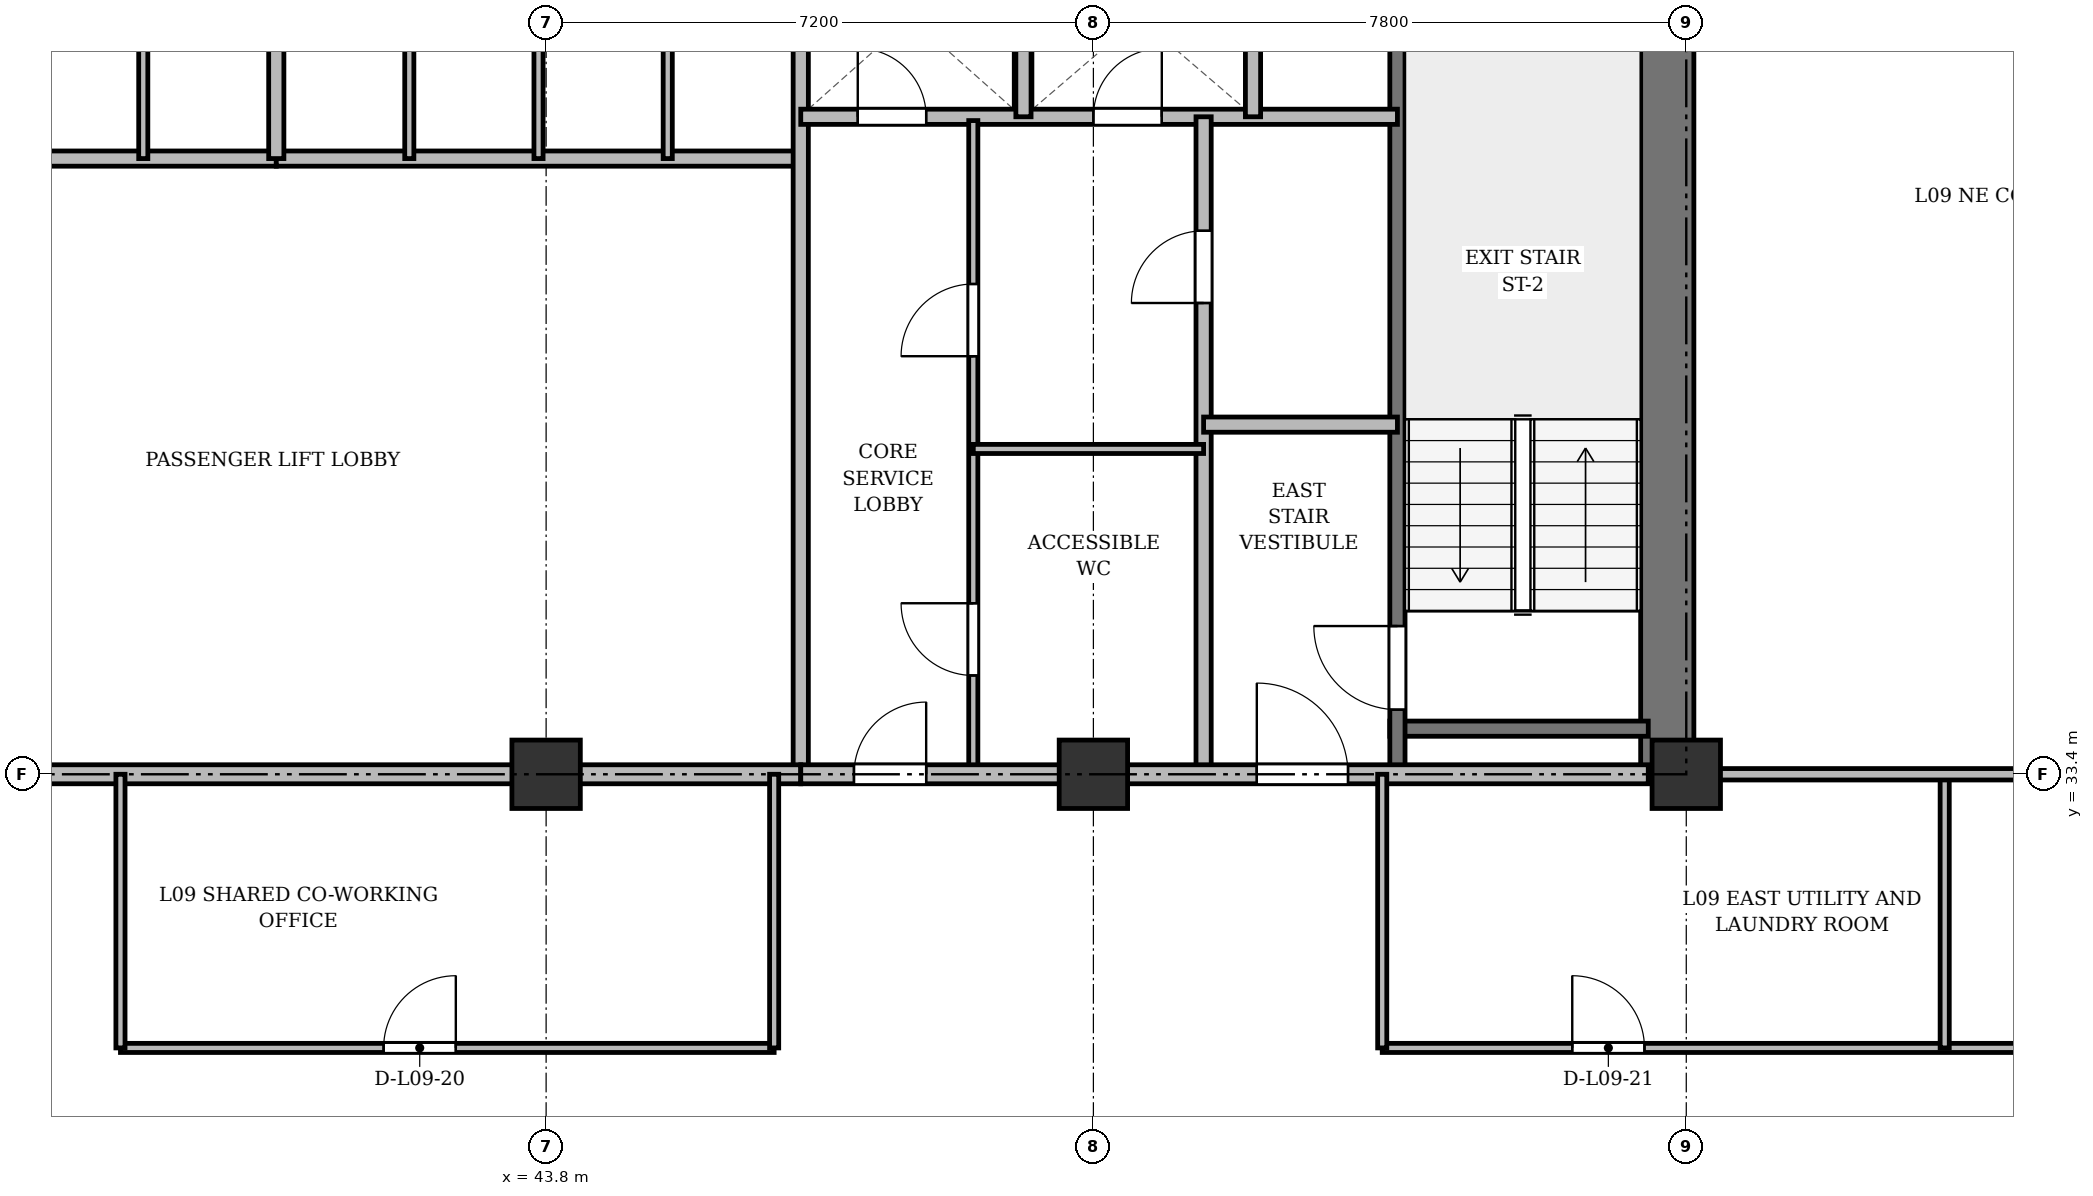
"""IFC4 building model, lengths in metres.
Left out: names, types, materials, properties, quantities, classifications, styles, units other than length and angle.
Written with IfcOpenShell. Run it as: python <this file> out.ifc"""

import sys

from ifc_helpers import new_model, si_unit, direction, frame, frame_2d, origin, origin_2d, place, context, subcontext, project, spatial, rectangle, extrude, source, transform, mapped, element, fill, save


model = new_model("IFC4")
c1 = context("Model", 3, precision=1e-05, world=origin(), true_north=direction((0.0, 1.0)))
c2 = subcontext(c1, "Body", "Model", "MODEL_VIEW")
j1 = project(units=[si_unit("LENGTHUNIT", "METRE"), si_unit("PLANEANGLEUNIT", "RADIAN")], contexts=[c1])
p1 = place(None, origin())
s1 = spatial("IfcSite", under=j1, at=p1, CompositionType="ELEMENT")
p2 = place(p1, origin())
s2 = spatial("IfcBuilding", under=s1, at=p2, CompositionType="ELEMENT")
p3 = place(p2, frame((0.0, 0.0, 37.9)))
s3 = spatial("IfcBuildingStorey", under=s2, at=p3, CompositionType="ELEMENT", Elevation=37.9)
m1 = source(origin(), c2, "Body", "SweptSolid", [
    extrude(rectangle(XDim=0.9, YDim=0.9, at=origin_2d()), origin(), (0.0, 0.0, 1.0), 3.6),
])
for number, where, z_axis, x_axis in (
    (1, (43.8, 33.4, 0.0), (0.0, 0.0, 1.0), (1.0, 0.0, 0.0)),
    (2, (51.0, 33.4, 0.0), (0.0, 0.0, 1.0), (1.0, 0.0, 0.0)),
    (3, (58.8, 33.4, 0.0), (0.0, 0.0, 1.0), (1.0, 0.0, 0.0)),
):
    element("IfcColumn", number, at=place(p3, frame(where, z_axis=z_axis, x_axis=x_axis)), inside=s3, PredefinedType="COLUMN", context=c2, shape_type="MappedRepresentation", body=[
        mapped(m1, transform((0.0, 0.0, 0.0), x_axis=(1.0, 0.0, 0.0), y_axis=(0.0, 1.0, 0.0), z_axis=(0.0, 0.0, 1.0), scale=1.0)),
    ])
p4 = place(p3, frame((58.55, 33.4, 0.0), z_axis=(0.0, 0.0, 1.0), x_axis=(0.0, 1.0, 0.0)))
e4 = element("IfcWall", 4, at=p4, inside=s3, PredefinedType="SHEAR", context=c2, shape_type="SweptSolid", body=[
    extrude(rectangle(XDim=11.7, YDim=0.7, at=frame_2d((5.85, 0.0))), origin(), (0.0, 0.0, 1.0), 3.34),
])
p5 = place(p3, frame((54.9, 34.0, 0.0), z_axis=(0.0, 0.0, 1.0), x_axis=(1.0, 0.0, 0.0)))
e5 = element("IfcWall", 5, at=p5, inside=s3, PredefinedType="SHEAR", context=c2, shape_type="SweptSolid", body=[
    extrude(rectangle(XDim=3.4, YDim=0.2, at=frame_2d((1.7, 0.0))), origin(), (0.0, 0.0, 1.0), 3.34),
])
p6 = place(p3, frame((55.0, 33.4, 0.0), z_axis=(0.0, 0.0, 1.0), x_axis=(0.0, 1.0, 0.0)))
e6 = element("IfcWall", 6, at=p6, inside=s3, PredefinedType="SHEAR", context=c2, shape_type="SweptSolid", body=[
    extrude(rectangle(XDim=11.1, YDim=0.2, at=frame_2d((5.55, 0.0))), origin(), (0.0, 0.0, 1.0), 3.34),
])
p7 = place(p6, frame((0.85, 0.0, 0.0)))
e7 = element("IfcOpeningElement", 7, at=p7, cuts=e6, PredefinedType="OPENING", context=c2, shape_type="SweptSolid", body=[
    extrude(rectangle(XDim=1.1, YDim=2.15, at=frame_2d((0.55, 1.075))), frame((0.0, 0.11, 0.0), z_axis=(0.0, -1.0, 0.0), x_axis=(1.0, 0.0, 0.0)), (0.0, 0.0, 1.0), 0.22),
])
p8 = place(p3, frame((33.35, 41.5, 0.0), z_axis=(0.0, 0.0, 1.0), x_axis=(1.0, 0.0, 0.0)))
e8 = element("IfcWall", 8, at=p8, inside=s3, PredefinedType="SOLIDWALL", context=c2, shape_type="SweptSolid", body=[
    extrude(rectangle(XDim=6.9, YDim=0.2, at=frame_2d((3.45, 0.0))), origin(), (0.0, 0.0, 1.0), 3.34),
])
p9 = place(p3, frame((38.5, 41.5, 0.0), z_axis=(0.0, 0.0, 1.0), x_axis=(0.0, 1.0, 0.0)))
e9 = element("IfcWall", 9, at=p9, inside=s3, PredefinedType="PARTITIONING", context=c2, shape_type="SweptSolid", body=[
    extrude(rectangle(XDim=3.2, YDim=0.12, at=frame_2d((1.6, 0.0))), origin(), (0.0, 0.0, 1.0), 3.34),
])
p10 = place(p3, frame((40.25, 41.5, 0.0), z_axis=(0.0, 0.0, 1.0), x_axis=(1.0, 0.0, 0.0)))
e10 = element("IfcWall", 10, at=p10, inside=s3, PredefinedType="SOLIDWALL", context=c2, shape_type="SweptSolid", body=[
    extrude(rectangle(XDim=6.9, YDim=0.2, at=frame_2d((3.45, 0.0))), origin(), (0.0, 0.0, 1.0), 2.752),
])
p11 = place(p3, frame((40.25, 41.5, 0.0), z_axis=(0.0, 0.0, 1.0), x_axis=(0.0, 1.0, 0.0)))
e11 = element("IfcWall", 11, at=p11, inside=s3, PredefinedType="SOLIDWALL", context=c2, shape_type="SweptSolid", body=[
    extrude(rectangle(XDim=3.2, YDim=0.2, at=frame_2d((1.6, 0.0))), origin(), (0.0, 0.0, 1.0), 3.34),
])
p12 = place(p3, frame((42.0, 41.5, 0.0), z_axis=(0.0, 0.0, 1.0), x_axis=(0.0, 1.0, 0.0)))
e12 = element("IfcWall", 12, at=p12, inside=s3, PredefinedType="PARTITIONING", context=c2, shape_type="SweptSolid", body=[
    extrude(rectangle(XDim=3.2, YDim=0.12, at=frame_2d((1.6, 0.0))), origin(), (0.0, 0.0, 1.0), 3.34),
])
p13 = place(p3, frame((43.7, 41.5, 0.0), z_axis=(0.0, 0.0, 1.0), x_axis=(0.0, 1.0, 0.0)))
e13 = element("IfcWall", 13, at=p13, inside=s3, PredefinedType="PARTITIONING", context=c2, shape_type="SweptSolid", body=[
    extrude(rectangle(XDim=3.2, YDim=0.12, at=frame_2d((1.6, 0.0))), origin(), (0.0, 0.0, 1.0), 2.752),
])
p14 = place(p3, frame((45.4, 41.5, 0.0), z_axis=(0.0, 0.0, 1.0), x_axis=(0.0, 1.0, 0.0)))
e14 = element("IfcWall", 14, at=p14, inside=s3, PredefinedType="PARTITIONING", context=c2, shape_type="SweptSolid", body=[
    extrude(rectangle(XDim=3.2, YDim=0.12, at=frame_2d((1.6, 0.0))), origin(), (0.0, 0.0, 1.0), 3.34),
])
p15 = place(p3, frame((47.15, 33.4, 0.0), z_axis=(0.0, 0.0, 1.0), x_axis=(0.0, 1.0, 0.0)))
e15 = element("IfcWall", 15, at=p15, inside=s3, PredefinedType="SOLIDWALL", context=c2, shape_type="SweptSolid", body=[
    extrude(rectangle(XDim=11.3, YDim=0.2, at=frame_2d((5.65, 0.0))), origin(), (0.0, 0.0, 1.0), 2.69),
])
p16 = place(p3, frame((26.3, 33.4, 0.0), z_axis=(0.0, 0.0, 1.0), x_axis=(1.0, 0.0, 0.0)))
e16 = element("IfcWall", 16, at=p16, inside=s3, PredefinedType="PARTITIONING", context=c2, shape_type="SweptSolid", body=[
    extrude(rectangle(XDim=20.85, YDim=0.25, at=frame_2d((10.425, 0.0))), origin(), (0.0, 0.0, 1.0), 2.69),
])
p17 = place(p16, frame((9.2, 0.0, 0.0)))
e17 = element("IfcOpeningElement", 17, at=p17, cuts=e16, PredefinedType="OPENING", context=c2, shape_type="SweptSolid", body=[
    extrude(rectangle(XDim=1.6, YDim=2.2, at=frame_2d((0.8, 1.1))), frame((0.0, 0.135, 0.0), z_axis=(0.0, -1.0, 0.0), x_axis=(1.0, 0.0, 0.0)), (0.0, 0.0, 1.0), 0.27),
])
p18 = place(p3, frame((47.15, 42.05, 0.0), z_axis=(0.0, 0.0, 1.0), x_axis=(1.0, 0.0, 0.0)))
e18 = element("IfcWall", 18, at=p18, inside=s3, PredefinedType="SOLIDWALL", context=c2, shape_type="SweptSolid", body=[
    extrude(rectangle(XDim=7.85, YDim=0.2, at=frame_2d((3.925, 0.0))), origin(), (0.0, 0.0, 1.0), 2.752),
])
p19 = place(p18, frame((0.75, 0.0, 0.0)))
e19 = element("IfcOpeningElement", 19, at=p19, cuts=e18, PredefinedType="OPENING", context=c2, shape_type="SweptSolid", body=[
    extrude(rectangle(XDim=0.9, YDim=2.1, at=frame_2d((0.45, 1.05))), frame((0.0, 0.11, 0.0), z_axis=(0.0, -1.0, 0.0), x_axis=(1.0, 0.0, 0.0)), (0.0, 0.0, 1.0), 0.22),
])
p20 = place(p18, frame((3.85, 0.0, 0.0)))
e20 = element("IfcOpeningElement", 20, at=p20, cuts=e18, PredefinedType="OPENING", context=c2, shape_type="SweptSolid", body=[
    extrude(rectangle(XDim=0.9, YDim=2.1, at=frame_2d((0.45, 1.05))), frame((0.0, 0.11, 0.0), z_axis=(0.0, -1.0, 0.0), x_axis=(1.0, 0.0, 0.0)), (0.0, 0.0, 1.0), 0.22),
])
for number, where, z_axis, x_axis in (
    (21, (50.08, 42.05, 0.0), (0.0, 0.0, 1.0), (0.0, 1.0, 0.0)),
    (22, (53.1, 42.05, 0.0), (0.0, 0.0, 1.0), (0.0, 1.0, 0.0)),
):
    element("IfcWall", number, at=place(p3, frame(where, z_axis=z_axis, x_axis=x_axis)), inside=s3, PredefinedType="SOLIDWALL", context=c2, shape_type="SweptSolid", body=[
        extrude(rectangle(XDim=2.65, YDim=0.2, at=frame_2d((1.325, 0.0))), origin(), (0.0, 0.0, 1.0), 3.34),
    ])
p21 = place(p3, frame((52.45, 33.4, 0.0), z_axis=(0.0, 0.0, 1.0), x_axis=(0.0, 1.0, 0.0)))
e23 = element("IfcWall", 23, at=p21, inside=s3, PredefinedType="PARTITIONING", context=c2, shape_type="SweptSolid", body=[
    extrude(rectangle(XDim=8.65, YDim=0.2, at=frame_2d((4.325, 0.0))), origin(), (0.0, 0.0, 1.0), 2.69),
])
p22 = place(p21, frame((6.2, 0.0, 0.0)))
e24 = element("IfcOpeningElement", 24, at=p22, cuts=e23, PredefinedType="OPENING", context=c2, shape_type="SweptSolid", body=[
    extrude(rectangle(XDim=0.95, YDim=2.15, at=frame_2d((0.475, 1.075))), frame((0.0, 0.11, 0.0), z_axis=(0.0, -1.0, 0.0), x_axis=(1.0, 0.0, 0.0)), (0.0, 0.0, 1.0), 0.22),
])
p23 = place(p3, frame((52.45, 38.0, 0.0), z_axis=(0.0, 0.0, 1.0), x_axis=(1.0, 0.0, 0.0)))
e25 = element("IfcWall", 25, at=p23, inside=s3, PredefinedType="PARTITIONING", context=c2, shape_type="SweptSolid", body=[
    extrude(rectangle(XDim=2.55, YDim=0.2, at=frame_2d((1.275, 0.0))), origin(), (0.0, 0.0, 1.0), 3.34),
])
p24 = place(p3, frame((49.42, 33.4, 0.0), z_axis=(0.0, 0.0, 1.0), x_axis=(0.0, 1.0, 0.0)))
e26 = element("IfcWall", 26, at=p24, inside=s3, PredefinedType="PARTITIONING", context=c2, shape_type="SweptSolid", body=[
    extrude(rectangle(XDim=8.6, YDim=0.12, at=frame_2d((4.3, 0.0))), origin(), (0.0, 0.0, 1.0), 2.69),
])
p25 = place(p24, frame((1.3, 0.0, 0.0)))
e27 = element("IfcOpeningElement", 27, at=p25, cuts=e26, PredefinedType="OPENING", context=c2, shape_type="SweptSolid", body=[
    extrude(rectangle(XDim=0.95, YDim=2.15, at=frame_2d((0.475, 1.075))), frame((0.0, 0.07, 0.0), z_axis=(0.0, -1.0, 0.0), x_axis=(1.0, 0.0, 0.0)), (0.0, 0.0, 1.0), 0.14),
])
p26 = place(p24, frame((5.5, 0.0, 0.0)))
e28 = element("IfcOpeningElement", 28, at=p26, cuts=e26, PredefinedType="OPENING", context=c2, shape_type="SweptSolid", body=[
    extrude(rectangle(XDim=0.95, YDim=2.15, at=frame_2d((0.475, 1.075))), frame((0.0, 0.07, 0.0), z_axis=(0.0, -1.0, 0.0), x_axis=(1.0, 0.0, 0.0)), (0.0, 0.0, 1.0), 0.14),
])
p27 = place(p3, frame((49.42, 37.68, 0.0), z_axis=(0.0, 0.0, 1.0), x_axis=(1.0, 0.0, 0.0)))
e29 = element("IfcWall", 29, at=p27, inside=s3, PredefinedType="PARTITIONING", context=c2, shape_type="SweptSolid", body=[
    extrude(rectangle(XDim=3.03, YDim=0.12, at=frame_2d((1.515, 0.0))), origin(), (0.0, 0.0, 1.0), 2.752),
])
p28 = place(p3, frame((47.15, 33.4, 0.0), z_axis=(0.0, 0.0, 1.0), x_axis=(1.0, 0.0, 0.0)))
e30 = element("IfcWall", 30, at=p28, inside=s3, PredefinedType="PARTITIONING", context=c2, shape_type="SweptSolid", body=[
    extrude(rectangle(XDim=11.15, YDim=0.25, at=frame_2d((5.575, 0.0))), origin(), (0.0, 0.0, 1.0), 2.69),
])
p29 = place(p28, frame((0.7, 0.0, 0.0)))
e31 = element("IfcOpeningElement", 31, at=p29, cuts=e30, PredefinedType="OPENING", context=c2, shape_type="SweptSolid", body=[
    extrude(rectangle(XDim=0.95, YDim=2.15, at=frame_2d((0.475, 1.075))), frame((0.0, 0.135, 0.0), z_axis=(0.0, -1.0, 0.0), x_axis=(1.0, 0.0, 0.0)), (0.0, 0.0, 1.0), 0.27),
])
p30 = place(p28, frame((6.0, 0.0, 0.0)))
e32 = element("IfcOpeningElement", 32, at=p30, cuts=e30, PredefinedType="OPENING", context=c2, shape_type="SweptSolid", body=[
    extrude(rectangle(XDim=1.2, YDim=2.15, at=frame_2d((0.6, 1.075))), frame((0.0, 0.135, 0.0), z_axis=(0.0, -1.0, 0.0), x_axis=(1.0, 0.0, 0.0)), (0.0, 0.0, 1.0), 0.27),
])
p31 = place(p3, frame((38.2, 29.8, 0.0), z_axis=(0.0, 0.0, 1.0), x_axis=(1.0, 0.0, 0.0)))
e33 = element("IfcWall", 33, at=p31, inside=s3, PredefinedType="PARTITIONING", context=c2, shape_type="SweptSolid", body=[
    extrude(rectangle(XDim=8.6, YDim=0.12, at=frame_2d((4.3, 0.0))), origin(), (0.0, 0.0, 1.0), 2.752),
])
p32 = place(p31, frame((3.462, 0.0, 0.0)))
e34 = element("IfcOpeningElement", 34, at=p32, cuts=e33, PredefinedType="OPENING", context=c2, shape_type="SweptSolid", body=[
    extrude(rectangle(XDim=0.95, YDim=2.15, at=frame_2d((0.475, 1.075))), frame((0.0, 0.07, 0.0), z_axis=(0.0, -1.0, 0.0), x_axis=(1.0, 0.0, 0.0)), (0.0, 0.0, 1.0), 0.14),
])
p33 = place(p3, frame((54.8, 29.8, 0.0), z_axis=(0.0, 0.0, 1.0), x_axis=(1.0, 0.0, 0.0)))
e35 = element("IfcWall", 35, at=p33, inside=s3, PredefinedType="PARTITIONING", context=c2, shape_type="SweptSolid", body=[
    extrude(rectangle(XDim=14.85, YDim=0.12, at=frame_2d((7.425, 0.0))), origin(), (0.0, 0.0, 1.0), 2.752),
])
p34 = place(p33, frame((2.5, 0.0, 0.0)))
e36 = element("IfcOpeningElement", 36, at=p34, cuts=e35, PredefinedType="OPENING", context=c2, shape_type="SweptSolid", body=[
    extrude(rectangle(XDim=0.95, YDim=2.15, at=frame_2d((0.475, 1.075))), frame((0.0, 0.07, 0.0), z_axis=(0.0, -1.0, 0.0), x_axis=(1.0, 0.0, 0.0)), (0.0, 0.0, 1.0), 0.14),
])
p35 = place(p33, frame((9.2, 0.0, 0.0)))
e37 = element("IfcOpeningElement", 37, at=p35, cuts=e35, PredefinedType="OPENING", context=c2, shape_type="SweptSolid", body=[
    extrude(rectangle(XDim=0.95, YDim=2.15, at=frame_2d((0.475, 1.075))), frame((0.0, 0.07, 0.0), z_axis=(0.0, -1.0, 0.0), x_axis=(1.0, 0.0, 0.0)), (0.0, 0.0, 1.0), 0.14),
])
for number, where, z_axis, x_axis in (
    (38, (62.2, 29.8, 0.0), (0.0, 0.0, 1.0), (0.0, 1.0, 0.0)),
    (39, (38.2, 29.8, 0.0), (0.0, 0.0, 1.0), (0.0, 1.0, 0.0)),
    (40, (46.8, 29.8, 0.0), (0.0, 0.0, 1.0), (0.0, 1.0, 0.0)),
    (41, (54.8, 29.8, 0.0), (0.0, 0.0, 1.0), (0.0, 1.0, 0.0)),
):
    element("IfcWall", number, at=place(p3, frame(where, z_axis=z_axis, x_axis=x_axis)), inside=s3, PredefinedType="PARTITIONING", context=c2, shape_type="SweptSolid", body=[
        extrude(rectangle(XDim=3.6, YDim=0.12, at=frame_2d((1.8, 0.0))), origin(), (0.0, 0.0, 1.0), 2.69),
    ])
p36 = place(p3, frame((58.8, 33.4, 0.0), z_axis=(0.0, 0.0, 1.0), x_axis=(1.0, 0.0, 0.0)))
e42 = element("IfcWall", 42, at=p36, inside=s3, PredefinedType="PARTITIONING", context=c2, shape_type="SweptSolid", body=[
    extrude(rectangle(XDim=10.85, YDim=0.15, at=frame_2d((5.425, 0.0))), origin(), (0.0, 0.0, 1.0), 2.69),
])
p37 = place(p36, frame((4.76, 0.0, 0.0)))
e43 = element("IfcOpeningElement", 43, at=p37, cuts=e42, PredefinedType="OPENING", context=c2, shape_type="SweptSolid", body=[
    extrude(rectangle(XDim=0.95, YDim=2.15, at=frame_2d((0.475, 1.075))), frame((0.0, 0.085, 0.0), z_axis=(0.0, -1.0, 0.0), x_axis=(1.0, 0.0, 0.0)), (0.0, 0.0, 1.0), 0.17),
])
m2 = source(origin(), c2, "Body", "SweptSolid", [
    extrude(rectangle(XDim=1.1, YDim=2.15, at=frame_2d((0.55, 1.075))), frame((0.0, 0.025, 0.0), z_axis=(0.0, -1.0, 0.0), x_axis=(1.0, 0.0, 0.0)), (0.0, 0.0, 1.0), 0.05),
])
p38 = place(p7, origin())
e44 = element("IfcDoor", 44, at=p38, inside=s3, OperationType="SINGLE_SWING_RIGHT", PredefinedType="DOOR", context=c2, shape_type="MappedRepresentation", body=[
    mapped(m2, transform((0.0, 0.0, 0.0), x_axis=(1.0, 0.0, 0.0), y_axis=(0.0, 1.0, 0.0), z_axis=(0.0, 0.0, 1.0), scale=1.0)),
])
fill(e7, e44)
m3 = source(origin(), c2, "Body", "SweptSolid", [
    extrude(rectangle(XDim=0.9, YDim=2.1, at=frame_2d((0.45, 1.05))), frame((0.0, 0.025, 0.0), z_axis=(0.0, -1.0, 0.0), x_axis=(1.0, 0.0, 0.0)), (0.0, 0.0, 1.0), 0.05),
])
p39 = place(p19, origin())
e45 = element("IfcDoor", 45, at=p39, inside=s3, OperationType="SINGLE_SWING_LEFT", PredefinedType="DOOR", context=c2, shape_type="MappedRepresentation", body=[
    mapped(m3, transform((0.0, 0.0, 0.0), x_axis=(1.0, 0.0, 0.0), y_axis=(0.0, 1.0, 0.0), z_axis=(0.0, 0.0, 1.0), scale=1.0)),
])
fill(e19, e45)
p40 = place(p20, origin())
e46 = element("IfcDoor", 46, at=p40, inside=s3, OperationType="SINGLE_SWING_RIGHT", PredefinedType="DOOR", context=c2, shape_type="MappedRepresentation", body=[
    mapped(m3, transform((0.0, 0.0, 0.0), x_axis=(1.0, 0.0, 0.0), y_axis=(0.0, 1.0, 0.0), z_axis=(0.0, 0.0, 1.0), scale=1.0)),
])
fill(e20, e46)
m4 = source(origin(), c2, "Body", "SweptSolid", [
    extrude(rectangle(XDim=0.95, YDim=2.15, at=frame_2d((0.475, 1.075))), frame((0.0, 0.025, 0.0), z_axis=(0.0, -1.0, 0.0), x_axis=(1.0, 0.0, 0.0)), (0.0, 0.0, 1.0), 0.05),
])
p41 = place(p22, origin())
e47 = element("IfcDoor", 47, at=p41, inside=s3, OperationType="SINGLE_SWING_LEFT", PredefinedType="DOOR", context=c2, shape_type="MappedRepresentation", body=[
    mapped(m4, transform((0.0, 0.0, 0.0), x_axis=(1.0, 0.0, 0.0), y_axis=(0.0, 1.0, 0.0), z_axis=(0.0, 0.0, 1.0), scale=1.0)),
])
fill(e24, e47)
p42 = place(p25, origin())
e48 = element("IfcDoor", 48, at=p42, inside=s3, OperationType="SINGLE_SWING_RIGHT", PredefinedType="DOOR", context=c2, shape_type="MappedRepresentation", body=[
    mapped(m4, transform((0.0, 0.0, 0.0), x_axis=(1.0, 0.0, 0.0), y_axis=(0.0, 1.0, 0.0), z_axis=(0.0, 0.0, 1.0), scale=1.0)),
])
fill(e27, e48)
p43 = place(p26, origin())
e49 = element("IfcDoor", 49, at=p43, inside=s3, OperationType="SINGLE_SWING_LEFT", PredefinedType="DOOR", context=c2, shape_type="MappedRepresentation", body=[
    mapped(m4, transform((0.0, 0.0, 0.0), x_axis=(1.0, 0.0, 0.0), y_axis=(0.0, 1.0, 0.0), z_axis=(0.0, 0.0, 1.0), scale=1.0)),
])
fill(e28, e49)
p44 = place(p29, origin())
e50 = element("IfcDoor", 50, at=p44, inside=s3, OperationType="SINGLE_SWING_RIGHT", PredefinedType="DOOR", context=c2, shape_type="MappedRepresentation", body=[
    mapped(m4, transform((0.0, 0.0, 0.0), x_axis=(1.0, 0.0, 0.0), y_axis=(0.0, 1.0, 0.0), z_axis=(0.0, 0.0, 1.0), scale=1.0)),
])
fill(e31, e50)
m5 = source(origin(), c2, "Body", "SweptSolid", [
    extrude(rectangle(XDim=1.2, YDim=2.15, at=frame_2d((0.6, 1.075))), frame((0.0, 0.025, 0.0), z_axis=(0.0, -1.0, 0.0), x_axis=(1.0, 0.0, 0.0)), (0.0, 0.0, 1.0), 0.05),
])
p45 = place(p30, origin())
e51 = element("IfcDoor", 51, at=p45, inside=s3, OperationType="SINGLE_SWING_LEFT", PredefinedType="DOOR", context=c2, shape_type="MappedRepresentation", body=[
    mapped(m5, transform((0.0, 0.0, 0.0), x_axis=(1.0, 0.0, 0.0), y_axis=(0.0, 1.0, 0.0), z_axis=(0.0, 0.0, 1.0), scale=1.0)),
])
fill(e32, e51)
p46 = place(p32, origin())
e52 = element("IfcDoor", 52, at=p46, inside=s3, OperationType="SINGLE_SWING_RIGHT", PredefinedType="DOOR", context=c2, shape_type="MappedRepresentation", body=[
    mapped(m4, transform((0.0, 0.0, 0.0), x_axis=(1.0, 0.0, 0.0), y_axis=(0.0, 1.0, 0.0), z_axis=(0.0, 0.0, 1.0), scale=1.0)),
])
fill(e34, e52)
p47 = place(p34, origin())
e53 = element("IfcDoor", 53, at=p47, inside=s3, OperationType="SINGLE_SWING_LEFT", PredefinedType="DOOR", context=c2, shape_type="MappedRepresentation", body=[
    mapped(m4, transform((0.0, 0.0, 0.0), x_axis=(1.0, 0.0, 0.0), y_axis=(0.0, 1.0, 0.0), z_axis=(0.0, 0.0, 1.0), scale=1.0)),
])
fill(e36, e53)
save(model, sys.argv[1])
